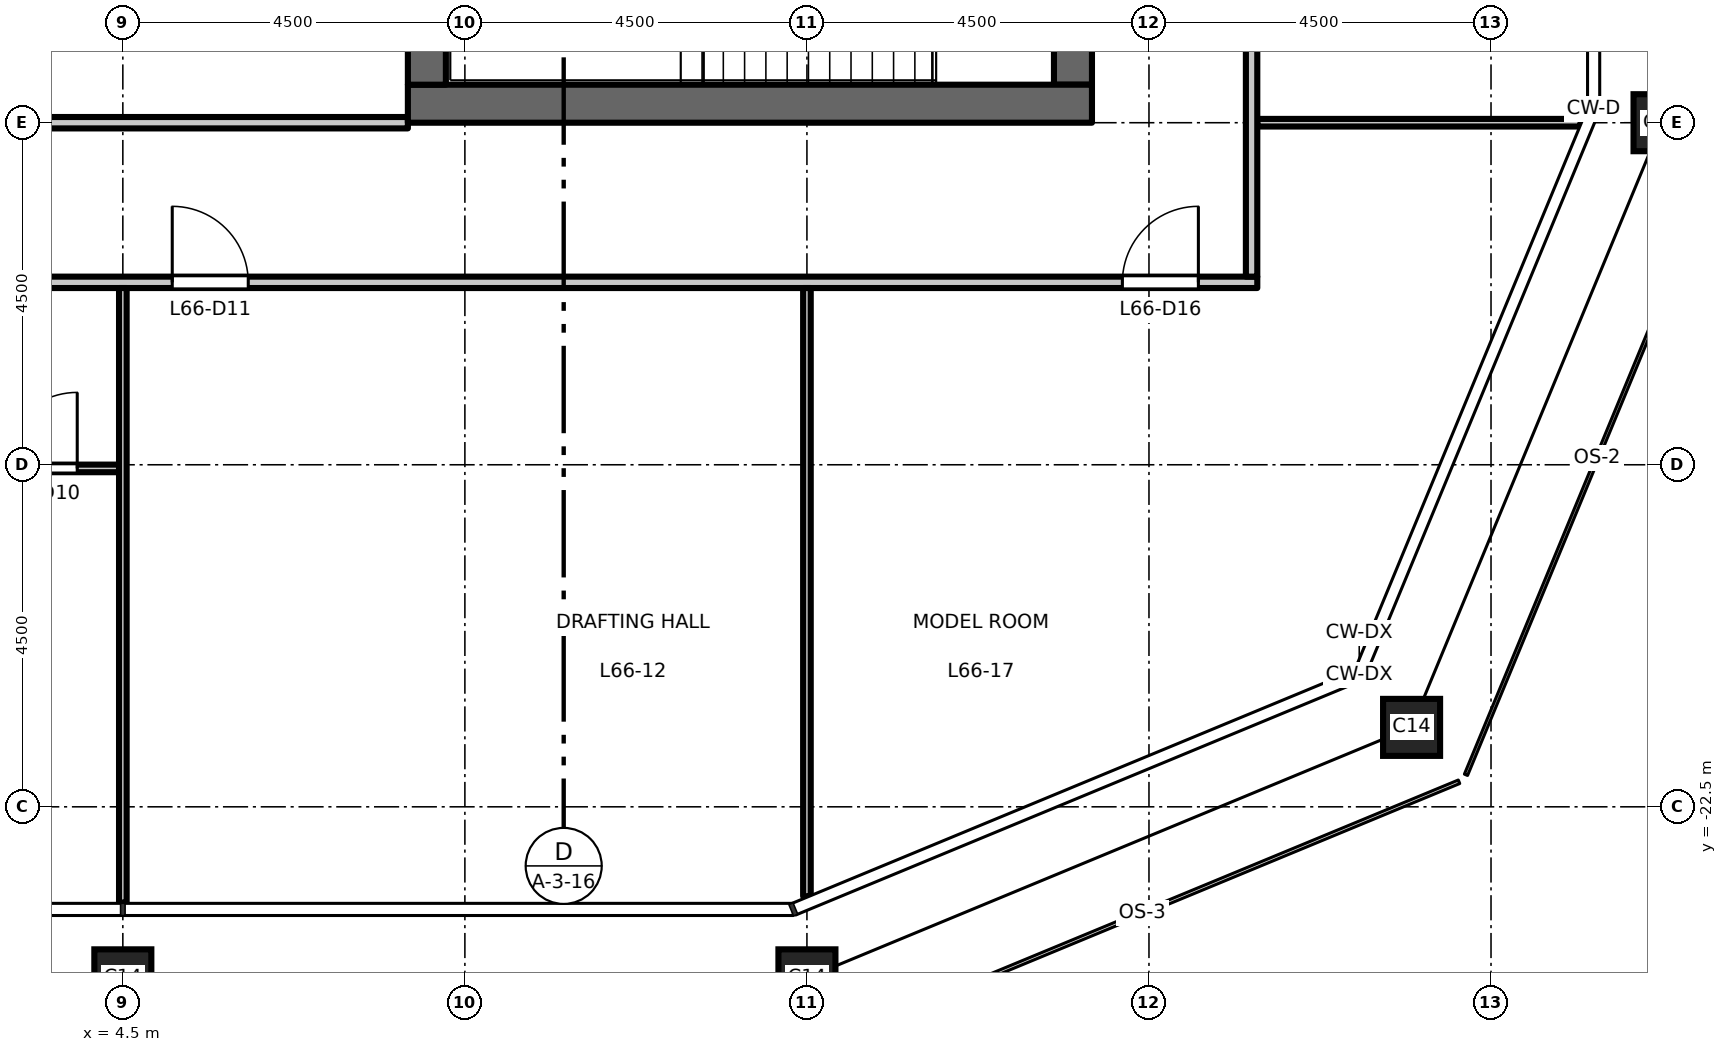
"""IFC4 building model, lengths in metres.
Left out: names, types, materials, properties, quantities, classifications, styles, units other than length and angle.
Written with IfcOpenShell. Run it as: python <this file> out.ifc"""

import sys

from ifc_helpers import new_model, si_unit, direction, frame, frame_2d, origin, origin_2d, place, context, subcontext, project, spatial, rectangle, hollow_rectangle, extrude, element, fill, save


model = new_model("IFC4")
c1 = context("Model", 3, precision=1e-05, world=origin(), true_north=direction((0.0, 1.0)))
c2 = subcontext(c1, "Body", "Model", "MODEL_VIEW")
j1 = project(units=[si_unit("LENGTHUNIT", "METRE"), si_unit("PLANEANGLEUNIT", "RADIAN")], contexts=[c1])
p1 = place(None, origin())
s1 = spatial("IfcSite", under=j1, at=p1, CompositionType="ELEMENT")
p2 = place(p1, origin())
s2 = spatial("IfcBuilding", under=s1, at=p2, CompositionType="ELEMENT")
p3 = place(p2, frame((0.0, 0.0, 307.7)))
s3 = spatial("IfcBuildingStorey", under=s2, at=p3, CompositionType="ELEMENT", Elevation=307.7)
for number, where, z_axis, x_axis in (
    (1, (4.5, -24.75, 0.0), (0.0, 0.0, 1.0), (1.0, 0.0, 0.0)),
    (2, (13.5, -24.75, 0.0), (0.0, 0.0, 1.0), (1.0, 0.0, 0.0)),
    (3, (21.455, -21.455, 0.0), (0.0, 0.0, 1.0), (1.0, 0.0, 0.0)),
    (4, (24.75, -13.5, 0.0), (0.0, 0.0, 1.0), (1.0, 0.0, 0.0)),
):
    element("IfcColumn", number, at=place(p3, frame(where, z_axis=z_axis, x_axis=x_axis)), inside=s3, PredefinedType="COLUMN", context=c2, shape_type="SweptSolid", body=[
        extrude(hollow_rectangle(XDim=0.75, YDim=0.75, WallThickness=0.04, at=origin_2d()), origin(), (0.0, 0.0, 1.0), 4.5),
    ])
p4 = place(p3, frame((17.0, -13.0, 0.0), z_axis=(0.0, 0.0, 1.0), x_axis=(0.0, 1.0, 0.0)))
e5 = element("IfcWall", 5, at=p4, inside=s3, PredefinedType="SHEAR", context=c2, shape_type="SweptSolid", body=[
    extrude(rectangle(XDim=26.0, YDim=0.5, at=frame_2d((13.0, 0.0))), origin(), (0.0, 0.0, 1.0), 4.35),
])
p5 = place(p4, frame((16.825, 0.0, 0.0)))
e6 = element("IfcOpeningElement", 6, at=p5, cuts=e5, PredefinedType="OPENING", context=c2, shape_type="SweptSolid", body=[
    extrude(rectangle(XDim=1.8, YDim=2.1, at=frame_2d((0.9, 1.05))), frame((0.0, 0.26, 0.0), z_axis=(0.0, -1.0, 0.0), x_axis=(1.0, 0.0, 0.0)), (0.0, 0.0, 1.0), 0.52),
])
p6 = place(p4, frame((7.375, 0.0, 0.0)))
e7 = element("IfcOpeningElement", 7, at=p6, cuts=e5, PredefinedType="OPENING", context=c2, shape_type="SweptSolid", body=[
    extrude(rectangle(XDim=1.8, YDim=2.1, at=frame_2d((0.9, 1.05))), frame((0.0, 0.26, 0.0), z_axis=(0.0, -1.0, 0.0), x_axis=(1.0, 0.0, 0.0)), (0.0, 0.0, 1.0), 0.52),
])
p7 = place(p3, frame((8.25, -13.25, 0.0), z_axis=(0.0, 0.0, 1.0), x_axis=(1.0, 0.0, 0.0)))
e8 = element("IfcWall", 8, at=p7, inside=s3, PredefinedType="SHEAR", context=c2, shape_type="SweptSolid", body=[
    extrude(rectangle(XDim=9.0, YDim=0.5, at=frame_2d((4.5, 0.0))), origin(), (0.0, 0.0, 1.0), 4.35),
])
p8 = place(p3, frame((8.5, -13.0, 0.0), z_axis=(0.0, 0.0, 1.0), x_axis=(0.0, 1.0, 0.0)))
e9 = element("IfcWall", 9, at=p8, inside=s3, PredefinedType="SHEAR", context=c2, shape_type="SweptSolid", body=[
    extrude(rectangle(XDim=26.0, YDim=0.5, at=frame_2d((13.0, 0.0))), origin(), (0.0, 0.0, 1.0), 4.35),
])
p9 = place(p3, frame((-13.45, -18.048, 0.0), z_axis=(0.0, 0.0, 1.0), x_axis=(1.0, 0.0, 0.0)))
e10 = element("IfcWall", 10, at=p9, inside=s3, PredefinedType="PARTITIONING", context=c2, shape_type="SweptSolid", body=[
    extrude(rectangle(XDim=17.9, YDim=0.1, at=frame_2d((8.95, 0.0))), origin(), (0.0, 0.0, 1.0), 3.99),
])
p10 = place(p9, frame((7.35, 0.0, 0.0)))
e11 = element("IfcOpeningElement", 11, at=p10, cuts=e10, PredefinedType="OPENING", context=c2, shape_type="SweptSolid", body=[
    extrude(rectangle(XDim=1.0, YDim=2.1, at=frame_2d((0.5, 1.05))), frame((0.0, 0.06, 0.0), z_axis=(0.0, -1.0, 0.0), x_axis=(1.0, 0.0, 0.0)), (0.0, 0.0, 1.0), 0.12),
])
p11 = place(p9, frame((16.35, 0.0, 0.0)))
e12 = element("IfcOpeningElement", 12, at=p11, cuts=e10, PredefinedType="OPENING", context=c2, shape_type="SweptSolid", body=[
    extrude(rectangle(XDim=1.0, YDim=2.1, at=frame_2d((0.5, 1.05))), frame((0.0, 0.06, 0.0), z_axis=(0.0, -1.0, 0.0), x_axis=(1.0, 0.0, 0.0)), (0.0, 0.0, 1.0), 0.12),
])
p12 = place(p3, frame((-19.425, -15.6, 0.0), z_axis=(0.0, 0.0, 1.0), x_axis=(1.0, 0.0, 0.0)))
e13 = element("IfcWall", 13, at=p12, inside=s3, PredefinedType="PARTITIONING", context=c2, shape_type="SweptSolid", body=[
    extrude(rectangle(XDim=38.85, YDim=0.15, at=frame_2d((19.425, 0.0))), origin(), (0.0, 0.0, 1.0), 4.35),
])
p13 = place(p12, frame((6.575, 0.0, 0.0)))
e14 = element("IfcOpeningElement", 14, at=p13, cuts=e13, PredefinedType="OPENING", context=c2, shape_type="SweptSolid", body=[
    extrude(rectangle(XDim=1.0, YDim=2.1, at=frame_2d((0.5, 1.05))), frame((0.0, 0.085, 0.0), z_axis=(0.0, -1.0, 0.0), x_axis=(1.0, 0.0, 0.0)), (0.0, 0.0, 1.0), 0.17),
])
p14 = place(p12, frame((15.575, 0.0, 0.0)))
e15 = element("IfcOpeningElement", 15, at=p14, cuts=e13, PredefinedType="OPENING", context=c2, shape_type="SweptSolid", body=[
    extrude(rectangle(XDim=1.0, YDim=2.1, at=frame_2d((0.5, 1.05))), frame((0.0, 0.085, 0.0), z_axis=(0.0, -1.0, 0.0), x_axis=(1.0, 0.0, 0.0)), (0.0, 0.0, 1.0), 0.17),
])
p15 = place(p12, frame((24.575, 0.0, 0.0)))
e16 = element("IfcOpeningElement", 16, at=p15, cuts=e13, PredefinedType="OPENING", context=c2, shape_type="SweptSolid", body=[
    extrude(rectangle(XDim=1.0, YDim=2.1, at=frame_2d((0.5, 1.05))), frame((0.0, 0.085, 0.0), z_axis=(0.0, -1.0, 0.0), x_axis=(1.0, 0.0, 0.0)), (0.0, 0.0, 1.0), 0.17),
])
p16 = place(p12, frame((0.725, 0.0, 0.0)))
e17 = element("IfcOpeningElement", 17, at=p16, cuts=e13, PredefinedType="OPENING", context=c2, shape_type="SweptSolid", body=[
    extrude(rectangle(XDim=1.0, YDim=2.1, at=frame_2d((0.5, 1.05))), frame((0.0, 0.085, 0.0), z_axis=(0.0, -1.0, 0.0), x_axis=(1.0, 0.0, 0.0)), (0.0, 0.0, 1.0), 0.17),
])
p17 = place(p12, frame((37.075, 0.0, 0.0)))
e18 = element("IfcOpeningElement", 18, at=p17, cuts=e13, PredefinedType="OPENING", context=c2, shape_type="SweptSolid", body=[
    extrude(rectangle(XDim=1.0, YDim=2.1, at=frame_2d((0.5, 1.05))), frame((0.0, 0.085, 0.0), z_axis=(0.0, -1.0, 0.0), x_axis=(1.0, 0.0, 0.0)), (0.0, 0.0, 1.0), 0.17),
])
p18 = place(p3, frame((19.425, -13.5, 0.0), z_axis=(0.0, 0.0, 1.0), x_axis=(1.0, 0.0, 0.0)))
e19 = element("IfcWall", 19, at=p18, inside=s3, PredefinedType="PARTITIONING", context=c2, shape_type="SweptSolid", body=[
    extrude(rectangle(XDim=4.253, YDim=0.1, at=frame_2d((2.126, 0.0))), origin(), (0.0, 0.0, 1.0), 4.35),
])
p19 = place(p3, frame((-8.25, -13.5, 0.0), z_axis=(0.0, 0.0, 1.0), x_axis=(1.0, 0.0, 0.0)))
e20 = element("IfcWall", 20, at=p19, inside=s3, PredefinedType="PARTITIONING", context=c2, shape_type="SweptSolid", body=[
    extrude(rectangle(XDim=16.5, YDim=0.15, at=frame_2d((8.25, 0.0))), origin(), (0.0, 0.0, 1.0), 4.35),
])
p20 = place(p19, frame((0.6, 0.0, 0.0)))
e21 = element("IfcOpeningElement", 21, at=p20, cuts=e20, PredefinedType="OPENING", context=c2, shape_type="SweptSolid", body=[
    extrude(rectangle(XDim=1.0, YDim=2.1, at=frame_2d((0.5, 1.05))), frame((0.0, 0.085, 0.0), z_axis=(0.0, -1.0, 0.0), x_axis=(1.0, 0.0, 0.0)), (0.0, 0.0, 1.0), 0.17),
])
p21 = place(p3, frame((4.5, -23.76, 0.0), z_axis=(0.0, 0.0, 1.0), x_axis=(0.0, 1.0, 0.0)))
e22 = element("IfcWall", 22, at=p21, inside=s3, PredefinedType="PARTITIONING", context=c2, shape_type="SweptSolid", body=[
    extrude(rectangle(XDim=8.085, YDim=0.1, at=frame_2d((4.042, 0.0))), origin(), (0.0, 0.0, 1.0), 3.65),
])
p22 = place(p3, frame((13.5, -23.678, 0.0), z_axis=(0.0, 0.0, 1.0), x_axis=(0.0, 1.0, 0.0)))
e23 = element("IfcWall", 23, at=p22, inside=s3, PredefinedType="PARTITIONING", context=c2, shape_type="SweptSolid", body=[
    extrude(rectangle(XDim=8.003, YDim=0.1, at=frame_2d((4.001, 0.0))), origin(), (0.0, 0.0, 1.0), 3.75),
])
p23 = place(p3, frame((19.35, -15.525, 0.0), z_axis=(0.0, 0.0, 1.0), x_axis=(0.0, 1.0, 0.0)))
e24 = element("IfcWall", 24, at=p23, inside=s3, PredefinedType="PARTITIONING", context=c2, shape_type="SweptSolid", body=[
    extrude(rectangle(XDim=31.05, YDim=0.15, at=frame_2d((15.525, 0.0))), origin(), (0.0, 0.0, 1.0), 4.35),
])
p24 = place(p23, frame((9.425, 0.0, 0.0)))
e25 = element("IfcOpeningElement", 25, at=p24, cuts=e24, PredefinedType="OPENING", context=c2, shape_type="SweptSolid", body=[
    extrude(rectangle(XDim=1.0, YDim=2.1, at=frame_2d((0.5, 1.05))), frame((0.0, 0.085, 0.0), z_axis=(0.0, -1.0, 0.0), x_axis=(1.0, 0.0, 0.0)), (0.0, 0.0, 1.0), 0.17),
])
p25 = place(p23, frame((11.675, 0.0, 0.0)))
e26 = element("IfcOpeningElement", 26, at=p25, cuts=e24, PredefinedType="OPENING", context=c2, shape_type="SweptSolid", body=[
    extrude(rectangle(XDim=1.0, YDim=2.1, at=frame_2d((0.5, 1.05))), frame((0.0, 0.085, 0.0), z_axis=(0.0, -1.0, 0.0), x_axis=(1.0, 0.0, 0.0)), (0.0, 0.0, 1.0), 0.17),
])
p26 = place(p23, frame((27.425, 0.0, 0.0)))
e27 = element("IfcOpeningElement", 27, at=p26, cuts=e24, PredefinedType="OPENING", context=c2, shape_type="SweptSolid", body=[
    extrude(rectangle(XDim=1.0, YDim=2.1, at=frame_2d((0.5, 1.05))), frame((0.0, 0.085, 0.0), z_axis=(0.0, -1.0, 0.0), x_axis=(1.0, 0.0, 0.0)), (0.0, 0.0, 1.0), 0.17),
])
p27 = place(p11, origin())
e28 = element("IfcDoor", 28, at=p27, inside=s3, OperationType="SINGLE_SWING_RIGHT", PredefinedType="DOOR", context=c2, shape_type="SweptSolid", body=[
    extrude(rectangle(XDim=1.0, YDim=2.1, at=frame_2d((0.5, 1.05))), frame((0.0, 0.025, 0.0), z_axis=(0.0, -1.0, 0.0), x_axis=(1.0, 0.0, 0.0)), (0.0, 0.0, 1.0), 0.05),
])
fill(e12, e28)
p28 = place(p15, origin())
e29 = element("IfcDoor", 29, at=p28, inside=s3, OperationType="SINGLE_SWING_LEFT", PredefinedType="DOOR", context=c2, shape_type="SweptSolid", body=[
    extrude(rectangle(XDim=1.0, YDim=2.1, at=frame_2d((0.5, 1.05))), frame((0.0, 0.025, 0.0), z_axis=(0.0, -1.0, 0.0), x_axis=(1.0, 0.0, 0.0)), (0.0, 0.0, 1.0), 0.05),
])
fill(e16, e29)
p29 = place(p17, origin())
e30 = element("IfcDoor", 30, at=p29, inside=s3, OperationType="SINGLE_SWING_RIGHT", PredefinedType="DOOR", context=c2, shape_type="SweptSolid", body=[
    extrude(rectangle(XDim=1.0, YDim=2.1, at=frame_2d((0.5, 1.05))), frame((0.0, 0.025, 0.0), z_axis=(0.0, -1.0, 0.0), x_axis=(1.0, 0.0, 0.0)), (0.0, 0.0, 1.0), 0.05),
])
fill(e18, e30)
save(model, sys.argv[1])
